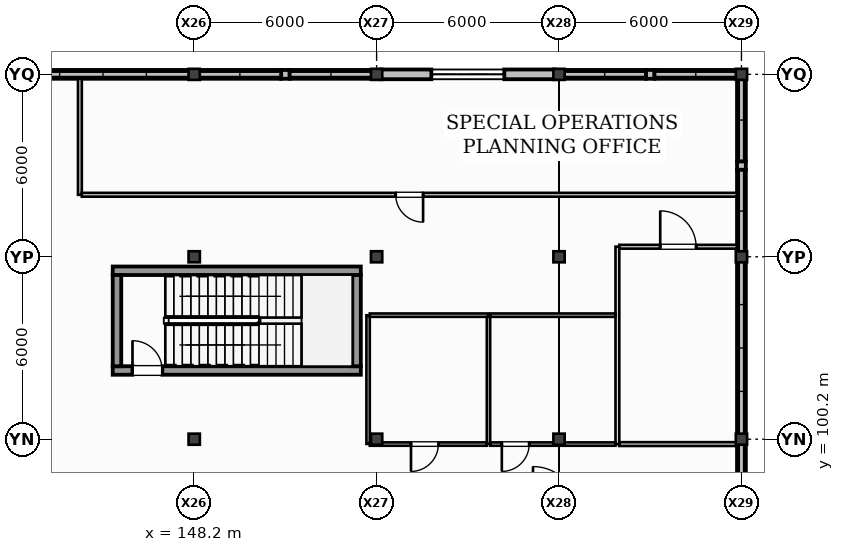
"""IFC4 building model, lengths in metres.
Left out: names, types, materials, properties, quantities, classifications, styles, units other than length and angle.
Written with IfcOpenShell. Run it as: python <this file> out.ifc"""

import sys

from ifc_helpers import new_model, si_unit, direction, frame, frame_2d, origin, origin_2d, place, context, subcontext, project, spatial, rectangle, i_section, extrude, element, fill, save


model = new_model("IFC4")
c1 = context("Model", 3, precision=1e-05, world=origin(), true_north=direction((0.0, 1.0)))
c2 = subcontext(c1, "Body", "Model", "MODEL_VIEW")
j1 = project(units=[si_unit("LENGTHUNIT", "METRE"), si_unit("PLANEANGLEUNIT", "RADIAN")], contexts=[c1])
p1 = place(None, origin())
s1 = spatial("IfcSite", under=j1, at=p1, CompositionType="ELEMENT")
p2 = place(p1, origin())
s2 = spatial("IfcBuilding", under=s1, at=p2, CompositionType="ELEMENT")
p3 = place(p2, frame((0.0, 0.0, 6.0)))
s3 = spatial("IfcBuildingStorey", under=s2, at=p3, CompositionType="ELEMENT", Elevation=6.0)
for number, where, z_axis, x_axis in (
    (1, (148.2, 100.2, 0.0), (0.0, 0.0, 1.0), (1.0, 0.0, 0.0)),
    (2, (148.2, 106.2, 0.0), (0.0, 0.0, 1.0), (1.0, 0.0, 0.0)),
    (3, (148.2, 112.2, 0.0), (0.0, 0.0, 1.0), (1.0, 0.0, 0.0)),
    (4, (154.2, 100.2, 0.0), (0.0, 0.0, 1.0), (1.0, 0.0, 0.0)),
    (5, (154.2, 106.2, 0.0), (0.0, 0.0, 1.0), (1.0, 0.0, 0.0)),
    (6, (154.2, 112.2, 0.0), (0.0, 0.0, 1.0), (1.0, 0.0, 0.0)),
    (7, (160.2, 100.2, 0.0), (0.0, 0.0, 1.0), (1.0, 0.0, 0.0)),
    (8, (160.2, 106.2, 0.0), (0.0, 0.0, 1.0), (1.0, 0.0, 0.0)),
    (9, (160.2, 112.2, 0.0), (0.0, 0.0, 1.0), (1.0, 0.0, 0.0)),
    (10, (166.2, 100.2, 0.0), (0.0, 0.0, 1.0), (1.0, 0.0, 0.0)),
    (11, (166.2, 106.2, 0.0), (0.0, 0.0, 1.0), (1.0, 0.0, 0.0)),
    (12, (166.2, 112.2, 0.0), (0.0, 0.0, 1.0), (1.0, 0.0, 0.0)),
):
    element("IfcColumn", number, at=place(p3, frame(where, z_axis=z_axis, x_axis=x_axis)), inside=s3, PredefinedType="COLUMN", context=c2, shape_type="SweptSolid", body=[
        extrude(i_section(OverallWidth=0.371, OverallDepth=0.364, WebThickness=0.013, FlangeThickness=0.022, at=origin_2d()), origin(), (0.0, 0.0, 1.0), 4.0),
    ])
p4 = place(p3, frame((148.055, 112.2, 0.0), z_axis=(0.0, 0.0, 1.0), x_axis=(-1.0, 0.0, 0.0)))
e13 = element("IfcWall", 13, at=p4, inside=s3, PredefinedType="STANDARD", context=c2, shape_type="SweptSolid", body=[
    extrude(rectangle(XDim=5.71, YDim=0.29, at=frame_2d((2.855, 0.0))), origin(), (0.0, 0.0, 1.0), 0.68),
])
p5 = place(p3, frame((151.34, 112.2, 0.0), z_axis=(0.0, 0.0, 1.0), x_axis=(-1.0, 0.0, 0.0)))
e14 = element("IfcWall", 14, at=p5, inside=s3, PredefinedType="STANDARD", context=c2, shape_type="SweptSolid", body=[
    extrude(rectangle(XDim=0.28, YDim=0.29, at=frame_2d((0.14, 0.0))), origin(), (0.0, 0.0, 1.0), 3.153),
])
p6 = place(p3, frame((154.055, 112.2, 0.0), z_axis=(0.0, 0.0, 1.0), x_axis=(-1.0, 0.0, 0.0)))
e15 = element("IfcWall", 15, at=p6, inside=s3, PredefinedType="STANDARD", context=c2, shape_type="SweptSolid", body=[
    extrude(rectangle(XDim=2.715, YDim=0.29, at=frame_2d((1.357, 0.0))), origin(), (0.0, 0.0, 1.0), 0.8),
])
p7 = place(p3, frame((151.06, 112.2, 0.0), z_axis=(0.0, 0.0, 1.0), x_axis=(-1.0, 0.0, 0.0)))
e16 = element("IfcWall", 16, at=p7, inside=s3, PredefinedType="STANDARD", context=c2, shape_type="SweptSolid", body=[
    extrude(rectangle(XDim=2.715, YDim=0.29, at=frame_2d((1.357, 0.0))), origin(), (0.0, 0.0, 1.0), 0.92),
])
p8 = place(p3, frame((160.055, 112.2, 0.0), z_axis=(0.0, 0.0, 1.0), x_axis=(-1.0, 0.0, 0.0)))
e17 = element("IfcWall", 17, at=p8, inside=s3, PredefinedType="STANDARD", context=c2, shape_type="SweptSolid", body=[
    extrude(rectangle(XDim=5.71, YDim=0.32, at=frame_2d((2.855, 0.0))), origin(), (0.0, 0.0, 1.0), 3.153),
])
p9 = place(p8, frame((1.655, 0.0, 1.0)))
e18 = element("IfcOpeningElement", 18, at=p9, cuts=e17, PredefinedType="OPENING", context=c2, shape_type="SweptSolid", body=[
    extrude(rectangle(XDim=2.4, YDim=1.36, at=frame_2d((1.2, 0.68))), frame((0.0, 0.17, 0.0), z_axis=(0.0, -1.0, 0.0), x_axis=(1.0, 0.0, 0.0)), (0.0, 0.0, 1.0), 0.34),
])
p10 = place(p3, frame((163.34, 112.2, 0.0), z_axis=(0.0, 0.0, 1.0), x_axis=(-1.0, 0.0, 0.0)))
e19 = element("IfcWall", 19, at=p10, inside=s3, PredefinedType="STANDARD", context=c2, shape_type="SweptSolid", body=[
    extrude(rectangle(XDim=0.28, YDim=0.29, at=frame_2d((0.14, 0.0))), origin(), (0.0, 0.0, 1.0), 3.223),
])
p11 = place(p3, frame((166.055, 112.2, 0.0), z_axis=(0.0, 0.0, 1.0), x_axis=(-1.0, 0.0, 0.0)))
e20 = element("IfcWall", 20, at=p11, inside=s3, PredefinedType="STANDARD", context=c2, shape_type="SweptSolid", body=[
    extrude(rectangle(XDim=2.715, YDim=0.29, at=frame_2d((1.357, 0.0))), origin(), (0.0, 0.0, 1.0), 0.32),
])
p12 = place(p3, frame((163.06, 112.2, 0.0), z_axis=(0.0, 0.0, 1.0), x_axis=(-1.0, 0.0, 0.0)))
e21 = element("IfcWall", 21, at=p12, inside=s3, PredefinedType="STANDARD", context=c2, shape_type="SweptSolid", body=[
    extrude(rectangle(XDim=2.715, YDim=0.29, at=frame_2d((1.357, 0.0))), origin(), (0.0, 0.0, 1.0), 0.44),
])
p13 = place(p3, frame((166.2, 97.34, 0.0), z_axis=(0.0, 0.0, 1.0), x_axis=(0.0, 1.0, 0.0)))
e22 = element("IfcWall", 22, at=p13, inside=s3, PredefinedType="STANDARD", context=c2, shape_type="SweptSolid", body=[
    extrude(rectangle(XDim=2.715, YDim=0.29, at=frame_2d((1.357, 0.0))), origin(), (0.0, 0.0, 1.0), 0.56),
])
p14 = place(p3, frame((166.2, 100.345, 0.0), z_axis=(0.0, 0.0, 1.0), x_axis=(0.0, 1.0, 0.0)))
e23 = element("IfcWall", 23, at=p14, inside=s3, PredefinedType="STANDARD", context=c2, shape_type="SweptSolid", body=[
    extrude(rectangle(XDim=5.71, YDim=0.29, at=frame_2d((2.855, 0.0))), origin(), (0.0, 0.0, 1.0), 0.68),
])
p15 = place(p3, frame((166.2, 109.06, 0.0), z_axis=(0.0, 0.0, 1.0), x_axis=(0.0, 1.0, 0.0)))
e24 = element("IfcWall", 24, at=p15, inside=s3, PredefinedType="STANDARD", context=c2, shape_type="SweptSolid", body=[
    extrude(rectangle(XDim=0.28, YDim=0.29, at=frame_2d((0.14, 0.0))), origin(), (0.0, 0.0, 1.0), 3.227),
])
p16 = place(p3, frame((166.2, 106.345, 0.0), z_axis=(0.0, 0.0, 1.0), x_axis=(0.0, 1.0, 0.0)))
e25 = element("IfcWall", 25, at=p16, inside=s3, PredefinedType="STANDARD", context=c2, shape_type="SweptSolid", body=[
    extrude(rectangle(XDim=2.715, YDim=0.29, at=frame_2d((1.357, 0.0))), origin(), (0.0, 0.0, 1.0), 0.8),
])
p17 = place(p3, frame((166.2, 109.34, 0.0), z_axis=(0.0, 0.0, 1.0), x_axis=(0.0, 1.0, 0.0)))
e26 = element("IfcWall", 26, at=p17, inside=s3, PredefinedType="STANDARD", context=c2, shape_type="SweptSolid", body=[
    extrude(rectangle(XDim=2.715, YDim=0.29, at=frame_2d((1.357, 0.0))), origin(), (0.0, 0.0, 1.0), 0.92),
])
p18 = place(p3, frame((145.52, 102.46, 0.0), z_axis=(0.0, 0.0, 1.0), x_axis=(1.0, 0.0, 0.0)))
e27 = element("IfcWall", 27, at=p18, inside=s3, PredefinedType="SHEAR", context=c2, shape_type="SweptSolid", body=[
    extrude(rectangle(XDim=8.16, YDim=0.28, at=frame_2d((4.08, 0.0))), origin(), (0.0, 0.0, 1.0), 4.0),
])
p19 = place(p18, frame((0.65, 0.0, 0.0)))
e28 = element("IfcOpeningElement", 28, at=p19, cuts=e27, PredefinedType="OPENING", context=c2, shape_type="SweptSolid", body=[
    extrude(rectangle(XDim=0.98, YDim=2.15, at=frame_2d((0.49, 1.075))), frame((0.0, 0.15, 0.0), z_axis=(0.0, -1.0, 0.0), x_axis=(1.0, 0.0, 0.0)), (0.0, 0.0, 1.0), 0.3),
])
p20 = place(p3, frame((153.68, 105.74, 0.0), z_axis=(0.0, 0.0, 1.0), x_axis=(-1.0, 0.0, 0.0)))
e29 = element("IfcWall", 29, at=p20, inside=s3, PredefinedType="SHEAR", context=c2, shape_type="SweptSolid", body=[
    extrude(rectangle(XDim=8.16, YDim=0.28, at=frame_2d((4.08, 0.0))), origin(), (0.0, 0.0, 1.0), 4.0),
])
for number, where, z_axis, x_axis in (
    (30, (145.66, 105.6, 0.0), (0.0, 0.0, 1.0), (0.0, -1.0, 0.0)),
    (31, (153.54, 102.6, 0.0), (0.0, 0.0, 1.0), (0.0, 1.0, 0.0)),
):
    element("IfcWall", number, at=place(p3, frame(where, z_axis=z_axis, x_axis=x_axis)), inside=s3, PredefinedType="SHEAR", context=c2, shape_type="SweptSolid", body=[
        extrude(rectangle(XDim=3.0, YDim=0.28, at=frame_2d((1.5, 0.0))), origin(), (0.0, 0.0, 1.0), 4.0),
    ])
p21 = place(p3, frame((144.44, 108.238, 0.0), z_axis=(0.0, 0.0, 1.0), x_axis=(0.0, 1.0, 0.0)))
e32 = element("IfcWall", 32, at=p21, inside=s3, PredefinedType="PARTITIONING", context=c2, shape_type="SweptSolid", body=[
    extrude(rectangle(XDim=3.817, YDim=0.125, at=frame_2d((1.909, 0.0))), origin(), (0.0, 0.0, 1.0), 3.289),
])
p22 = place(p3, frame((166.055, 108.24, 0.0), z_axis=(0.0, 0.0, 1.0), x_axis=(-1.0, 0.0, 0.0)))
e33 = element("IfcWall", 33, at=p22, inside=s3, PredefinedType="PARTITIONING", context=c2, shape_type="SweptSolid", body=[
    extrude(rectangle(XDim=21.552, YDim=0.125, at=frame_2d((10.776, 0.0))), origin(), (0.0, 0.0, 1.0), 3.72),
])
p23 = place(p22, frame((10.326, 0.0, 0.0)))
e34 = element("IfcOpeningElement", 34, at=p23, cuts=e33, PredefinedType="OPENING", context=c2, shape_type="SweptSolid", body=[
    extrude(rectangle(XDim=0.9, YDim=2.1, at=frame_2d((0.45, 1.05))), frame((0.0, 0.073, 0.0), z_axis=(0.0, -1.0, 0.0), x_axis=(1.0, 0.0, 0.0)), (0.0, 0.0, 1.0), 0.145),
])
p24 = place(p3, frame((153.92, 100.045, 0.0), z_axis=(0.0, 0.0, 1.0), x_axis=(0.0, 1.0, 0.0)))
e35 = element("IfcWall", 35, at=p24, inside=s3, PredefinedType="PARTITIONING", context=c2, shape_type="SweptSolid", body=[
    extrude(rectangle(XDim=4.23, YDim=0.11, at=frame_2d((2.115, 0.0))), origin(), (0.0, 0.0, 1.0), 3.157),
])
p25 = place(p3, frame((153.975, 104.28, 0.0), z_axis=(0.0, 0.0, 1.0), x_axis=(1.0, 0.0, 0.0)))
e36 = element("IfcWall", 36, at=p25, inside=s3, PredefinedType="PARTITIONING", context=c2, shape_type="SweptSolid", body=[
    extrude(rectangle(XDim=3.9, YDim=0.11, at=frame_2d((1.95, 0.0))), origin(), (0.0, 0.0, 1.0), 3.72),
])
p26 = place(p3, frame((157.88, 104.225, 0.0), z_axis=(0.0, 0.0, 1.0), x_axis=(0.0, -1.0, 0.0)))
e37 = element("IfcWall", 37, at=p26, inside=s3, PredefinedType="PARTITIONING", context=c2, shape_type="SweptSolid", body=[
    extrude(rectangle(XDim=4.18, YDim=0.11, at=frame_2d((2.09, 0.0))), origin(), (0.0, 0.0, 1.0), 3.334),
])
p27 = place(p3, frame((157.825, 100.04, 0.0), z_axis=(0.0, 0.0, 1.0), x_axis=(-1.0, 0.0, 0.0)))
e38 = element("IfcWall", 38, at=p27, inside=s3, PredefinedType="PARTITIONING", context=c2, shape_type="SweptSolid", body=[
    extrude(rectangle(XDim=3.85, YDim=0.11, at=frame_2d((1.925, 0.0))), origin(), (0.0, 0.0, 1.0), 3.153),
])
p28 = place(p27, frame((1.594, 0.0, 0.0)))
e39 = element("IfcOpeningElement", 39, at=p28, cuts=e38, PredefinedType="OPENING", context=c2, shape_type="SweptSolid", body=[
    extrude(rectangle(XDim=0.9, YDim=2.1, at=frame_2d((0.45, 1.05))), frame((0.0, 0.065, 0.0), z_axis=(0.0, -1.0, 0.0), x_axis=(1.0, 0.0, 0.0)), (0.0, 0.0, 1.0), 0.13),
])
p29 = place(p3, frame((162.12, 100.038, 0.0), z_axis=(0.0, 0.0, 1.0), x_axis=(0.0, 1.0, 0.0)))
e40 = element("IfcWall", 40, at=p29, inside=s3, PredefinedType="PARTITIONING", context=c2, shape_type="SweptSolid", body=[
    extrude(rectangle(XDim=6.495, YDim=0.125, at=frame_2d((3.248, 0.0))), origin(), (0.0, 0.0, 1.0), 3.449),
])
p30 = place(p3, frame((162.183, 106.53, 0.0), z_axis=(0.0, 0.0, 1.0), x_axis=(1.0, 0.0, 0.0)))
e41 = element("IfcWall", 41, at=p30, inside=s3, PredefinedType="PARTITIONING", context=c2, shape_type="SweptSolid", body=[
    extrude(rectangle(XDim=3.872, YDim=0.125, at=frame_2d((1.936, 0.0))), origin(), (0.0, 0.0, 1.0), 3.223),
])
p31 = place(p30, frame((1.346, 0.0, 0.0)))
e42 = element("IfcOpeningElement", 42, at=p31, cuts=e41, PredefinedType="OPENING", context=c2, shape_type="SweptSolid", body=[
    extrude(rectangle(XDim=1.18, YDim=2.16, at=frame_2d((0.59, 1.08))), frame((0.0, 0.073, 0.0), z_axis=(0.0, -1.0, 0.0), x_axis=(1.0, 0.0, 0.0)), (0.0, 0.0, 1.0), 0.145),
])
p32 = place(p3, frame((166.055, 100.04, 0.0), z_axis=(0.0, 0.0, 1.0), x_axis=(-1.0, 0.0, 0.0)))
e43 = element("IfcWall", 43, at=p32, inside=s3, PredefinedType="PARTITIONING", context=c2, shape_type="SweptSolid", body=[
    extrude(rectangle(XDim=3.872, YDim=0.125, at=frame_2d((1.936, 0.0))), origin(), (0.0, 0.0, 1.0), 3.223),
])
p33 = place(p3, frame((157.935, 104.28, 0.0), z_axis=(0.0, 0.0, 1.0), x_axis=(1.0, 0.0, 0.0)))
e44 = element("IfcWall", 44, at=p33, inside=s3, PredefinedType="PARTITIONING", context=c2, shape_type="SweptSolid", body=[
    extrude(rectangle(XDim=4.123, YDim=0.11, at=frame_2d((2.061, 0.0))), origin(), (0.0, 0.0, 1.0), 3.72),
])
p34 = place(p3, frame((162.058, 100.04, 0.0), z_axis=(0.0, 0.0, 1.0), x_axis=(-1.0, 0.0, 0.0)))
e45 = element("IfcWall", 45, at=p34, inside=s3, PredefinedType="PARTITIONING", context=c2, shape_type="SweptSolid", body=[
    extrude(rectangle(XDim=4.123, YDim=0.11, at=frame_2d((2.061, 0.0))), origin(), (0.0, 0.0, 1.0), 3.153),
])
p35 = place(p34, frame((2.839, 0.0, 0.0)))
e46 = element("IfcOpeningElement", 46, at=p35, cuts=e45, PredefinedType="OPENING", context=c2, shape_type="SweptSolid", body=[
    extrude(rectangle(XDim=0.9, YDim=2.1, at=frame_2d((0.45, 1.05))), frame((0.0, 0.065, 0.0), z_axis=(0.0, -1.0, 0.0), x_axis=(1.0, 0.0, 0.0)), (0.0, 0.0, 1.0), 0.13),
])
p36 = place(p9, origin())
e47 = element("IfcWindow", 47, at=p36, inside=s3, PartitioningType="SINGLE_PANEL", PredefinedType="WINDOW", context=c2, shape_type="SweptSolid", body=[
    extrude(rectangle(XDim=2.4, YDim=1.36, at=frame_2d((1.2, 0.68))), frame((0.0, 0.03, 0.0), z_axis=(0.0, -1.0, 0.0), x_axis=(1.0, 0.0, 0.0)), (0.0, 0.0, 1.0), 0.06),
])
fill(e18, e47)
p37 = place(p19, origin())
e48 = element("IfcDoor", 48, at=p37, inside=s3, OperationType="SINGLE_SWING_LEFT", PredefinedType="DOOR", context=c2, shape_type="SweptSolid", body=[
    extrude(rectangle(XDim=0.98, YDim=2.15, at=frame_2d((0.49, 1.075))), frame((0.0, 0.025, 0.0), z_axis=(0.0, -1.0, 0.0), x_axis=(1.0, 0.0, 0.0)), (0.0, 0.0, 1.0), 0.05),
])
fill(e28, e48)
p38 = place(p23, frame((0.9, 0.0, 0.0), z_axis=(0.0, 0.0, 1.0), x_axis=(-1.0, 0.0, 0.0)))
e49 = element("IfcDoor", 49, at=p38, inside=s3, OperationType="SINGLE_SWING_LEFT", PredefinedType="DOOR", context=c2, shape_type="SweptSolid", body=[
    extrude(rectangle(XDim=0.9, YDim=2.1, at=frame_2d((0.45, 1.05))), frame((0.0, 0.025, 0.0), z_axis=(0.0, -1.0, 0.0), x_axis=(1.0, 0.0, 0.0)), (0.0, 0.0, 1.0), 0.05),
])
fill(e34, e49)
p39 = place(p28, frame((0.9, 0.0, 0.0), z_axis=(0.0, 0.0, 1.0), x_axis=(-1.0, 0.0, 0.0)))
e50 = element("IfcDoor", 50, at=p39, inside=s3, OperationType="SINGLE_SWING_RIGHT", PredefinedType="DOOR", context=c2, shape_type="SweptSolid", body=[
    extrude(rectangle(XDim=0.9, YDim=2.1, at=frame_2d((0.45, 1.05))), frame((0.0, 0.025, 0.0), z_axis=(0.0, -1.0, 0.0), x_axis=(1.0, 0.0, 0.0)), (0.0, 0.0, 1.0), 0.05),
])
fill(e39, e50)
p40 = place(p31, frame((1.18, 0.0, 0.0), z_axis=(0.0, 0.0, 1.0), x_axis=(-1.0, 0.0, 0.0)))
e51 = element("IfcDoor", 51, at=p40, inside=s3, OperationType="SINGLE_SWING_LEFT", PredefinedType="DOOR", context=c2, shape_type="SweptSolid", body=[
    extrude(rectangle(XDim=1.18, YDim=2.16, at=frame_2d((0.59, 1.08))), frame((0.0, 0.025, 0.0), z_axis=(0.0, -1.0, 0.0), x_axis=(1.0, 0.0, 0.0)), (0.0, 0.0, 1.0), 0.05),
])
fill(e42, e51)
p41 = place(p35, frame((0.9, 0.0, 0.0), z_axis=(0.0, 0.0, 1.0), x_axis=(-1.0, 0.0, 0.0)))
e52 = element("IfcDoor", 52, at=p41, inside=s3, OperationType="SINGLE_SWING_RIGHT", PredefinedType="DOOR", context=c2, shape_type="SweptSolid", body=[
    extrude(rectangle(XDim=0.9, YDim=2.1, at=frame_2d((0.45, 1.05))), frame((0.0, 0.025, 0.0), z_axis=(0.0, -1.0, 0.0), x_axis=(1.0, 0.0, 0.0)), (0.0, 0.0, 1.0), 0.05),
])
fill(e46, e52)
save(model, sys.argv[1])
